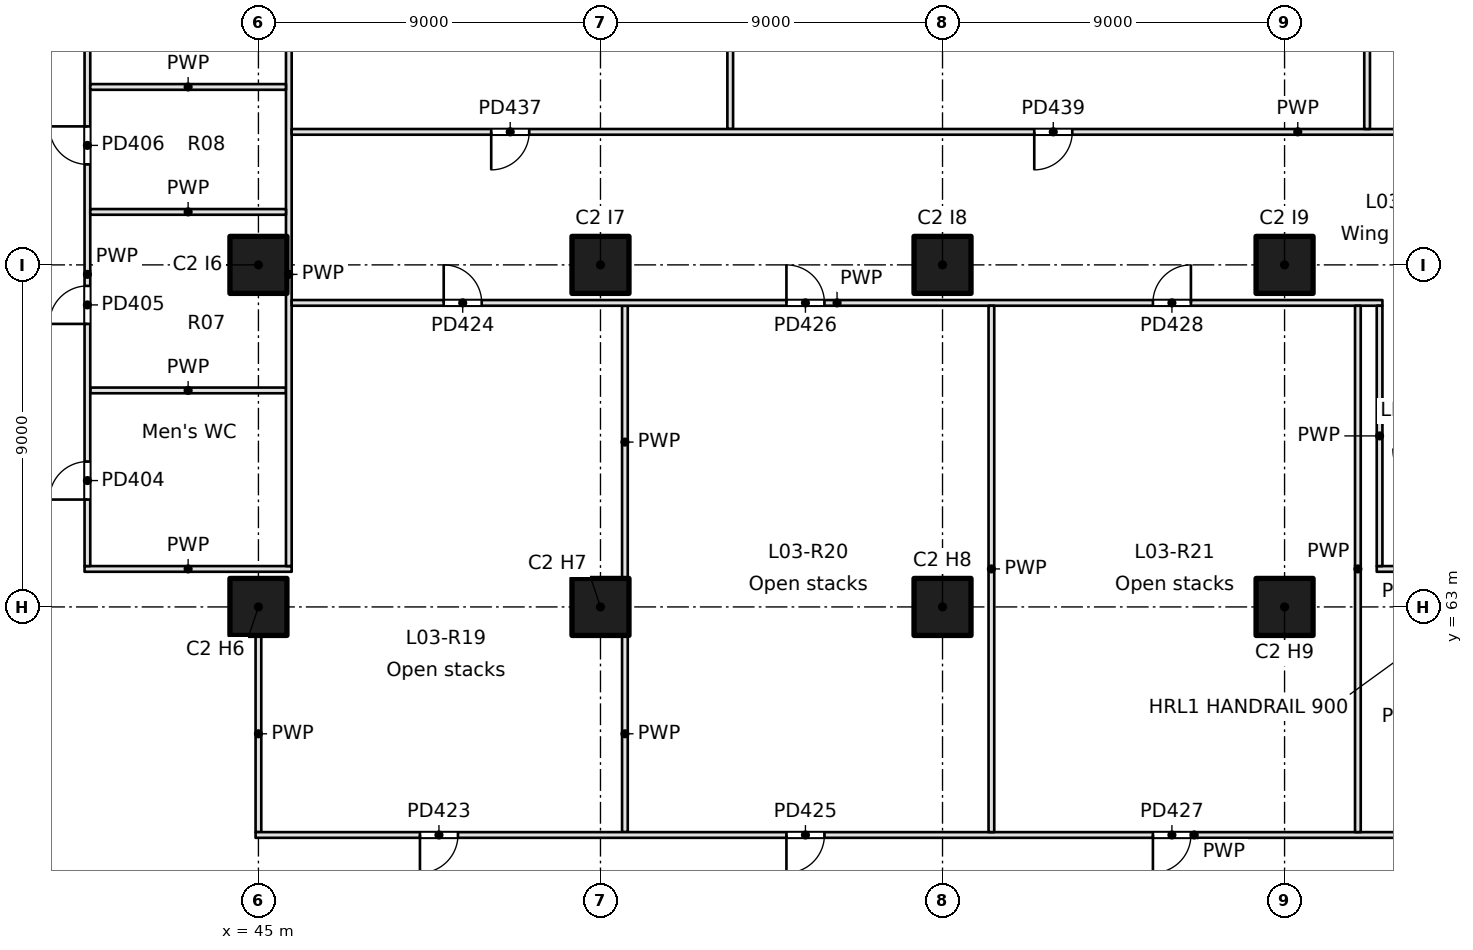
"""IFC4 building model, lengths in metres.
Left out: names, types, materials, properties, quantities, classifications, styles, units other than length and angle.
Written with IfcOpenShell. Run it as: python <this file> out.ifc"""

import sys

from ifc_helpers import new_model, si_unit, direction, frame, frame_2d, origin, origin_2d, place, context, subcontext, project, spatial, rectangle, extrude, element, fill, save


model = new_model("IFC4")
c1 = context("Model", 3, precision=1e-05, world=origin(), true_north=direction((0.0, 1.0)))
c2 = subcontext(c1, "Body", "Model", "MODEL_VIEW")
j1 = project(units=[si_unit("LENGTHUNIT", "METRE"), si_unit("PLANEANGLEUNIT", "RADIAN")], contexts=[c1])
p1 = place(None, origin())
s1 = spatial("IfcSite", under=j1, at=p1, CompositionType="ELEMENT")
p2 = place(p1, origin())
s2 = spatial("IfcBuilding", under=s1, at=p2, CompositionType="ELEMENT")
p3 = place(p2, frame((0.0, 0.0, 16.8)))
s3 = spatial("IfcBuildingStorey", under=s2, at=p3, CompositionType="ELEMENT", Elevation=16.8)
for number, where, z_axis, x_axis in (
    (1, (45.0, 63.0, 0.0), (0.0, 0.0, 1.0), (1.0, 0.0, 0.0)),
    (2, (45.0, 72.0, 0.0), (0.0, 0.0, 1.0), (1.0, 0.0, 0.0)),
    (3, (54.0, 63.0, 0.0), (0.0, 0.0, 1.0), (1.0, 0.0, 0.0)),
    (4, (54.0, 72.0, 0.0), (0.0, 0.0, 1.0), (1.0, 0.0, 0.0)),
    (5, (63.0, 63.0, 0.0), (0.0, 0.0, 1.0), (1.0, 0.0, 0.0)),
    (6, (63.0, 72.0, 0.0), (0.0, 0.0, 1.0), (1.0, 0.0, 0.0)),
    (7, (72.0, 63.0, 0.0), (0.0, 0.0, 1.0), (1.0, 0.0, 0.0)),
    (8, (72.0, 72.0, 0.0), (0.0, 0.0, 1.0), (1.0, 0.0, 0.0)),
):
    element("IfcColumn", number, at=place(p3, frame(where, z_axis=z_axis, x_axis=x_axis)), inside=s3, PredefinedType="COLUMN", context=c2, shape_type="SweptSolid", body=[
        extrude(rectangle(XDim=1.5, YDim=1.5, at=origin_2d()), origin(), (0.0, 0.0, 1.0), 4.8),
    ])
p4 = place(p3, frame((40.575, 68.697, 0.0), z_axis=(0.0, 0.0, 1.0), x_axis=(1.0, 0.0, 0.0)))
e9 = element("IfcWall", 9, at=p4, inside=s3, PredefinedType="PARTITIONING", context=c2, shape_type="SweptSolid", body=[
    extrude(rectangle(XDim=5.15, YDim=0.15, at=frame_2d((2.575, 0.0))), origin(), (0.0, 0.0, 1.0), 4.45),
])
p5 = place(p3, frame((45.875, 64.0, 0.0), z_axis=(0.0, 0.0, 1.0), x_axis=(-1.0, 0.0, 0.0)))
e10 = element("IfcWall", 10, at=p5, inside=s3, PredefinedType="PARTITIONING", context=c2, shape_type="SweptSolid", body=[
    extrude(rectangle(XDim=5.45, YDim=0.15, at=frame_2d((2.725, 0.0))), origin(), (0.0, 0.0, 1.0), 4.45),
])
p6 = place(p3, frame((74.425, 64.0, 0.0), z_axis=(0.0, 0.0, 1.0), x_axis=(1.0, 0.0, 0.0)))
e11 = element("IfcWall", 11, at=p6, inside=s3, PredefinedType="PARTITIONING", context=c2, shape_type="SweptSolid", body=[
    extrude(rectangle(XDim=1.375, YDim=0.15, at=frame_2d((0.688, 0.0))), origin(), (0.0, 0.0, 1.0), 4.45),
])
p7 = place(p3, frame((45.8, 79.425, 0.0), z_axis=(0.0, 0.0, 1.0), x_axis=(0.0, -1.0, 0.0)))
e12 = element("IfcWall", 12, at=p7, inside=s3, PredefinedType="PARTITIONING", context=c2, shape_type="SweptSolid", body=[
    extrude(rectangle(XDim=15.35, YDim=0.15, at=frame_2d((7.675, 0.0))), origin(), (0.0, 0.0, 1.0), 4.45),
])
p8 = place(p3, frame((40.5, 64.075, 0.0), z_axis=(0.0, 0.0, 1.0), x_axis=(0.0, 1.0, 0.0)))
e13 = element("IfcWall", 13, at=p8, inside=s3, PredefinedType="PARTITIONING", context=c2, shape_type="SweptSolid", body=[
    extrude(rectangle(XDim=15.35, YDim=0.15, at=frame_2d((7.675, 0.0))), origin(), (0.0, 0.0, 1.0), 4.45),
])
p9 = place(p8, frame((1.75, 0.0, 0.0)))
e14 = element("IfcOpeningElement", 14, at=p9, cuts=e13, PredefinedType="OPENING", context=c2, shape_type="SweptSolid", body=[
    extrude(rectangle(XDim=1.0, YDim=2.1, at=frame_2d((0.5, 1.05))), frame((0.0, 0.075, 0.0), z_axis=(0.0, -1.0, 0.0), x_axis=(1.0, 0.0, 0.0)), (0.0, 0.0, 1.0), 0.15),
])
p10 = place(p8, frame((6.372, 0.0, 0.0)))
e15 = element("IfcOpeningElement", 15, at=p10, cuts=e13, PredefinedType="OPENING", context=c2, shape_type="SweptSolid", body=[
    extrude(rectangle(XDim=1.0, YDim=2.1, at=frame_2d((0.5, 1.05))), frame((0.0, 0.075, 0.0), z_axis=(0.0, -1.0, 0.0), x_axis=(1.0, 0.0, 0.0)), (0.0, 0.0, 1.0), 0.15),
])
p11 = place(p8, frame((10.569, 0.0, 0.0)))
e16 = element("IfcOpeningElement", 16, at=p11, cuts=e13, PredefinedType="OPENING", context=c2, shape_type="SweptSolid", body=[
    extrude(rectangle(XDim=1.0, YDim=2.1, at=frame_2d((0.5, 1.05))), frame((0.0, 0.075, 0.0), z_axis=(0.0, -1.0, 0.0), x_axis=(1.0, 0.0, 0.0)), (0.0, 0.0, 1.0), 0.15),
])
for number, where, z_axis, x_axis in (
    (17, (40.575, 73.394, 0.0), (0.0, 0.0, 1.0), (1.0, 0.0, 0.0)),
    (18, (40.575, 76.682, 0.0), (0.0, 0.0, 1.0), (1.0, 0.0, 0.0)),
):
    element("IfcWall", number, at=place(p3, frame(where, z_axis=z_axis, x_axis=x_axis)), inside=s3, PredefinedType="PARTITIONING", context=c2, shape_type="SweptSolid", body=[
        extrude(rectangle(XDim=5.15, YDim=0.15, at=frame_2d((2.575, 0.0))), origin(), (0.0, 0.0, 1.0), 4.45),
    ])
for number, where, z_axis, x_axis in (
    (19, (45.0, 57.075, 0.0), (0.0, 0.0, 1.0), (0.0, 1.0, 0.0)),
    (20, (54.643, 57.075, 0.0), (0.0, 0.0, 1.0), (0.0, 1.0, 0.0)),
):
    element("IfcWall", number, at=place(p3, frame(where, z_axis=z_axis, x_axis=x_axis)), inside=s3, PredefinedType="PARTITIONING", context=c2, shape_type="SweptSolid", body=[
        extrude(rectangle(XDim=5.175, YDim=0.15, at=frame_2d((2.587, 0.0))), origin(), (0.0, 0.0, 1.0), 4.45),
    ])
p12 = place(p3, frame((54.643, 63.75, 0.0), z_axis=(0.0, 0.0, 1.0), x_axis=(0.0, 1.0, 0.0)))
e21 = element("IfcWall", 21, at=p12, inside=s3, PredefinedType="PARTITIONING", context=c2, shape_type="SweptSolid", body=[
    extrude(rectangle(XDim=7.175, YDim=0.15, at=frame_2d((3.587, 0.0))), origin(), (0.0, 0.0, 1.0), 4.45),
])
p13 = place(p3, frame((94.32, 57.0, 0.0), z_axis=(0.0, 0.0, 1.0), x_axis=(-1.0, 0.0, 0.0)))
e22 = element("IfcWall", 22, at=p13, inside=s3, PredefinedType="PARTITIONING", context=c2, shape_type="SweptSolid", body=[
    extrude(rectangle(XDim=49.395, YDim=0.15, at=frame_2d((24.698, 0.0))), origin(), (0.0, 0.0, 1.0), 4.45),
])
p14 = place(p13, frame((44.07, 0.0, 0.0)))
e23 = element("IfcOpeningElement", 23, at=p14, cuts=e22, PredefinedType="OPENING", context=c2, shape_type="SweptSolid", body=[
    extrude(rectangle(XDim=1.0, YDim=2.1, at=frame_2d((0.5, 1.05))), frame((0.0, 0.075, 0.0), z_axis=(0.0, -1.0, 0.0), x_axis=(1.0, 0.0, 0.0)), (0.0, 0.0, 1.0), 0.15),
])
p15 = place(p13, frame((34.427, 0.0, 0.0)))
e24 = element("IfcOpeningElement", 24, at=p15, cuts=e22, PredefinedType="OPENING", context=c2, shape_type="SweptSolid", body=[
    extrude(rectangle(XDim=1.0, YDim=2.1, at=frame_2d((0.5, 1.05))), frame((0.0, 0.075, 0.0), z_axis=(0.0, -1.0, 0.0), x_axis=(1.0, 0.0, 0.0)), (0.0, 0.0, 1.0), 0.15),
])
p16 = place(p13, frame((24.784, 0.0, 0.0)))
e25 = element("IfcOpeningElement", 25, at=p16, cuts=e22, PredefinedType="OPENING", context=c2, shape_type="SweptSolid", body=[
    extrude(rectangle(XDim=1.0, YDim=2.1, at=frame_2d((0.5, 1.05))), frame((0.0, 0.075, 0.0), z_axis=(0.0, -1.0, 0.0), x_axis=(1.0, 0.0, 0.0)), (0.0, 0.0, 1.0), 0.15),
])
p17 = place(p13, frame((14.591, 0.0, 0.0)))
e26 = element("IfcOpeningElement", 26, at=p17, cuts=e22, PredefinedType="OPENING", context=c2, shape_type="SweptSolid", body=[
    extrude(rectangle(XDim=1.8, YDim=2.1, at=frame_2d((0.9, 1.05))), frame((0.0, 0.075, 0.0), z_axis=(0.0, -1.0, 0.0), x_axis=(1.0, 0.0, 0.0)), (0.0, 0.0, 1.0), 0.15),
])
p18 = place(p13, frame((5.499, 0.0, 0.0)))
e27 = element("IfcOpeningElement", 27, at=p18, cuts=e22, PredefinedType="OPENING", context=c2, shape_type="SweptSolid", body=[
    extrude(rectangle(XDim=1.0, YDim=2.1, at=frame_2d((0.5, 1.05))), frame((0.0, 0.075, 0.0), z_axis=(0.0, -1.0, 0.0), x_axis=(1.0, 0.0, 0.0)), (0.0, 0.0, 1.0), 0.15),
])
p19 = place(p3, frame((45.875, 71.0, 0.0), z_axis=(0.0, 0.0, 1.0), x_axis=(1.0, 0.0, 0.0)))
e28 = element("IfcWall", 28, at=p19, inside=s3, PredefinedType="PARTITIONING", context=c2, shape_type="SweptSolid", body=[
    extrude(rectangle(XDim=28.7, YDim=0.15, at=frame_2d((14.35, 0.0))), origin(), (0.0, 0.0, 1.0), 4.45),
])
p20 = place(p19, frame((4.0, 0.0, 0.0)))
e29 = element("IfcOpeningElement", 29, at=p20, cuts=e28, PredefinedType="OPENING", context=c2, shape_type="SweptSolid", body=[
    extrude(rectangle(XDim=1.0, YDim=2.1, at=frame_2d((0.5, 1.05))), frame((0.0, 0.075, 0.0), z_axis=(0.0, -1.0, 0.0), x_axis=(1.0, 0.0, 0.0)), (0.0, 0.0, 1.0), 0.15),
])
p21 = place(p19, frame((13.018, 0.0, 0.0)))
e30 = element("IfcOpeningElement", 30, at=p21, cuts=e28, PredefinedType="OPENING", context=c2, shape_type="SweptSolid", body=[
    extrude(rectangle(XDim=1.0, YDim=2.1, at=frame_2d((0.5, 1.05))), frame((0.0, 0.075, 0.0), z_axis=(0.0, -1.0, 0.0), x_axis=(1.0, 0.0, 0.0)), (0.0, 0.0, 1.0), 0.15),
])
p22 = place(p19, frame((22.661, 0.0, 0.0)))
e31 = element("IfcOpeningElement", 31, at=p22, cuts=e28, PredefinedType="OPENING", context=c2, shape_type="SweptSolid", body=[
    extrude(rectangle(XDim=1.0, YDim=2.1, at=frame_2d((0.5, 1.05))), frame((0.0, 0.075, 0.0), z_axis=(0.0, -1.0, 0.0), x_axis=(1.0, 0.0, 0.0)), (0.0, 0.0, 1.0), 0.15),
])
for number, where, z_axis, x_axis in (
    (32, (64.286, 57.075, 0.0), (0.0, 0.0, 1.0), (0.0, 1.0, 0.0)),
    (33, (73.929, 57.075, 0.0), (0.0, 0.0, 1.0), (0.0, 1.0, 0.0)),
):
    element("IfcWall", number, at=place(p3, frame(where, z_axis=z_axis, x_axis=x_axis)), inside=s3, PredefinedType="PARTITIONING", context=c2, shape_type="SweptSolid", body=[
        extrude(rectangle(XDim=13.85, YDim=0.15, at=frame_2d((6.925, 0.0))), origin(), (0.0, 0.0, 1.0), 4.45),
    ])
p23 = place(p3, frame((74.5, 70.925, 0.0), z_axis=(0.0, 0.0, 1.0), x_axis=(0.0, -1.0, 0.0)))
e34 = element("IfcWall", 34, at=p23, inside=s3, PredefinedType="PARTITIONING", context=c2, shape_type="SweptSolid", body=[
    extrude(rectangle(XDim=6.85, YDim=0.15, at=frame_2d((3.425, 0.0))), origin(), (0.0, 0.0, 1.0), 4.45),
])
p24 = place(p3, frame((57.414, 75.575, 0.0), z_axis=(0.0, 0.0, 1.0), x_axis=(0.0, 1.0, 0.0)))
e35 = element("IfcWall", 35, at=p24, inside=s3, PredefinedType="PARTITIONING", context=c2, shape_type="SweptSolid", body=[
    extrude(rectangle(XDim=17.925, YDim=0.15, at=frame_2d((8.962, 0.0))), origin(), (0.0, 0.0, 1.0), 4.45),
])
p25 = place(p3, frame((98.82, 75.5, 0.0), z_axis=(0.0, 0.0, 1.0), x_axis=(-1.0, 0.0, 0.0)))
e36 = element("IfcWall", 36, at=p25, inside=s3, PredefinedType="PARTITIONING", context=c2, shape_type="SweptSolid", body=[
    extrude(rectangle(XDim=52.945, YDim=0.15, at=frame_2d((26.473, 0.0))), origin(), (0.0, 0.0, 1.0), 4.45),
])
p26 = place(p25, frame((46.695, 0.0, 0.0)))
e37 = element("IfcOpeningElement", 37, at=p26, cuts=e36, PredefinedType="OPENING", context=c2, shape_type="SweptSolid", body=[
    extrude(rectangle(XDim=1.0, YDim=2.1, at=frame_2d((0.5, 1.05))), frame((0.0, 0.075, 0.0), z_axis=(0.0, -1.0, 0.0), x_axis=(1.0, 0.0, 0.0)), (0.0, 0.0, 1.0), 0.15),
])
p27 = place(p25, frame((32.406, 0.0, 0.0)))
e38 = element("IfcOpeningElement", 38, at=p27, cuts=e36, PredefinedType="OPENING", context=c2, shape_type="SweptSolid", body=[
    extrude(rectangle(XDim=1.0, YDim=2.1, at=frame_2d((0.5, 1.05))), frame((0.0, 0.075, 0.0), z_axis=(0.0, -1.0, 0.0), x_axis=(1.0, 0.0, 0.0)), (0.0, 0.0, 1.0), 0.15),
])
p28 = place(p25, frame((19.148, 0.0, 0.0)))
e39 = element("IfcOpeningElement", 39, at=p28, cuts=e36, PredefinedType="OPENING", context=c2, shape_type="SweptSolid", body=[
    extrude(rectangle(XDim=1.0, YDim=2.1, at=frame_2d((0.5, 1.05))), frame((0.0, 0.075, 0.0), z_axis=(0.0, -1.0, 0.0), x_axis=(1.0, 0.0, 0.0)), (0.0, 0.0, 1.0), 0.15),
])
p29 = place(p25, frame((6.967, 0.0, 0.0)))
e40 = element("IfcOpeningElement", 40, at=p29, cuts=e36, PredefinedType="OPENING", context=c2, shape_type="SweptSolid", body=[
    extrude(rectangle(XDim=1.0, YDim=2.1, at=frame_2d((0.5, 1.05))), frame((0.0, 0.075, 0.0), z_axis=(0.0, -1.0, 0.0), x_axis=(1.0, 0.0, 0.0)), (0.0, 0.0, 1.0), 0.15),
])
p30 = place(p3, frame((74.172, 75.575, 0.0), z_axis=(0.0, 0.0, 1.0), x_axis=(0.0, 1.0, 0.0)))
e41 = element("IfcWall", 41, at=p30, inside=s3, PredefinedType="PARTITIONING", context=c2, shape_type="SweptSolid", body=[
    extrude(rectangle(XDim=17.925, YDim=0.15, at=frame_2d((8.962, 0.0))), origin(), (0.0, 0.0, 1.0), 4.45),
])
p31 = place(p9, origin())
e42 = element("IfcDoor", 42, at=p31, inside=s3, OperationType="SINGLE_SWING_LEFT", PredefinedType="DOOR", context=c2, shape_type="SweptSolid", body=[
    extrude(rectangle(XDim=1.0, YDim=2.1, at=frame_2d((0.5, 1.05))), frame((0.0, 0.025, 0.0), z_axis=(0.0, -1.0, 0.0), x_axis=(1.0, 0.0, 0.0)), (0.0, 0.0, 1.0), 0.05),
])
fill(e14, e42)
p32 = place(p10, origin())
e43 = element("IfcDoor", 43, at=p32, inside=s3, OperationType="SINGLE_SWING_LEFT", PredefinedType="DOOR", context=c2, shape_type="SweptSolid", body=[
    extrude(rectangle(XDim=1.0, YDim=2.1, at=frame_2d((0.5, 1.05))), frame((0.0, 0.025, 0.0), z_axis=(0.0, -1.0, 0.0), x_axis=(1.0, 0.0, 0.0)), (0.0, 0.0, 1.0), 0.05),
])
fill(e15, e43)
p33 = place(p11, origin())
e44 = element("IfcDoor", 44, at=p33, inside=s3, OperationType="SINGLE_SWING_RIGHT", PredefinedType="DOOR", context=c2, shape_type="SweptSolid", body=[
    extrude(rectangle(XDim=1.0, YDim=2.1, at=frame_2d((0.5, 1.05))), frame((0.0, 0.025, 0.0), z_axis=(0.0, -1.0, 0.0), x_axis=(1.0, 0.0, 0.0)), (0.0, 0.0, 1.0), 0.05),
])
fill(e16, e44)
p34 = place(p14, origin())
e45 = element("IfcDoor", 45, at=p34, inside=s3, OperationType="SINGLE_SWING_RIGHT", PredefinedType="DOOR", context=c2, shape_type="SweptSolid", body=[
    extrude(rectangle(XDim=1.0, YDim=2.1, at=frame_2d((0.5, 1.05))), frame((0.0, 0.025, 0.0), z_axis=(0.0, -1.0, 0.0), x_axis=(1.0, 0.0, 0.0)), (0.0, 0.0, 1.0), 0.05),
])
fill(e23, e45)
p35 = place(p20, origin())
e46 = element("IfcDoor", 46, at=p35, inside=s3, OperationType="SINGLE_SWING_LEFT", PredefinedType="DOOR", context=c2, shape_type="SweptSolid", body=[
    extrude(rectangle(XDim=1.0, YDim=2.1, at=frame_2d((0.5, 1.05))), frame((0.0, 0.025, 0.0), z_axis=(0.0, -1.0, 0.0), x_axis=(1.0, 0.0, 0.0)), (0.0, 0.0, 1.0), 0.05),
])
fill(e29, e46)
p36 = place(p15, origin())
e47 = element("IfcDoor", 47, at=p36, inside=s3, OperationType="SINGLE_SWING_RIGHT", PredefinedType="DOOR", context=c2, shape_type="SweptSolid", body=[
    extrude(rectangle(XDim=1.0, YDim=2.1, at=frame_2d((0.5, 1.05))), frame((0.0, 0.025, 0.0), z_axis=(0.0, -1.0, 0.0), x_axis=(1.0, 0.0, 0.0)), (0.0, 0.0, 1.0), 0.05),
])
fill(e24, e47)
p37 = place(p21, origin())
e48 = element("IfcDoor", 48, at=p37, inside=s3, OperationType="SINGLE_SWING_LEFT", PredefinedType="DOOR", context=c2, shape_type="SweptSolid", body=[
    extrude(rectangle(XDim=1.0, YDim=2.1, at=frame_2d((0.5, 1.05))), frame((0.0, 0.025, 0.0), z_axis=(0.0, -1.0, 0.0), x_axis=(1.0, 0.0, 0.0)), (0.0, 0.0, 1.0), 0.05),
])
fill(e30, e48)
p38 = place(p16, origin())
e49 = element("IfcDoor", 49, at=p38, inside=s3, OperationType="SINGLE_SWING_RIGHT", PredefinedType="DOOR", context=c2, shape_type="SweptSolid", body=[
    extrude(rectangle(XDim=1.0, YDim=2.1, at=frame_2d((0.5, 1.05))), frame((0.0, 0.025, 0.0), z_axis=(0.0, -1.0, 0.0), x_axis=(1.0, 0.0, 0.0)), (0.0, 0.0, 1.0), 0.05),
])
fill(e25, e49)
p39 = place(p22, origin())
e50 = element("IfcDoor", 50, at=p39, inside=s3, OperationType="SINGLE_SWING_RIGHT", PredefinedType="DOOR", context=c2, shape_type="SweptSolid", body=[
    extrude(rectangle(XDim=1.0, YDim=2.1, at=frame_2d((0.5, 1.05))), frame((0.0, 0.025, 0.0), z_axis=(0.0, -1.0, 0.0), x_axis=(1.0, 0.0, 0.0)), (0.0, 0.0, 1.0), 0.05),
])
fill(e31, e50)
p40 = place(p26, origin())
e51 = element("IfcDoor", 51, at=p40, inside=s3, OperationType="SINGLE_SWING_RIGHT", PredefinedType="DOOR", context=c2, shape_type="SweptSolid", body=[
    extrude(rectangle(XDim=1.0, YDim=2.1, at=frame_2d((0.5, 1.05))), frame((0.0, 0.025, 0.0), z_axis=(0.0, -1.0, 0.0), x_axis=(1.0, 0.0, 0.0)), (0.0, 0.0, 1.0), 0.05),
])
fill(e37, e51)
p41 = place(p27, origin())
e52 = element("IfcDoor", 52, at=p41, inside=s3, OperationType="SINGLE_SWING_RIGHT", PredefinedType="DOOR", context=c2, shape_type="SweptSolid", body=[
    extrude(rectangle(XDim=1.0, YDim=2.1, at=frame_2d((0.5, 1.05))), frame((0.0, 0.025, 0.0), z_axis=(0.0, -1.0, 0.0), x_axis=(1.0, 0.0, 0.0)), (0.0, 0.0, 1.0), 0.05),
])
fill(e38, e52)
save(model, sys.argv[1])
